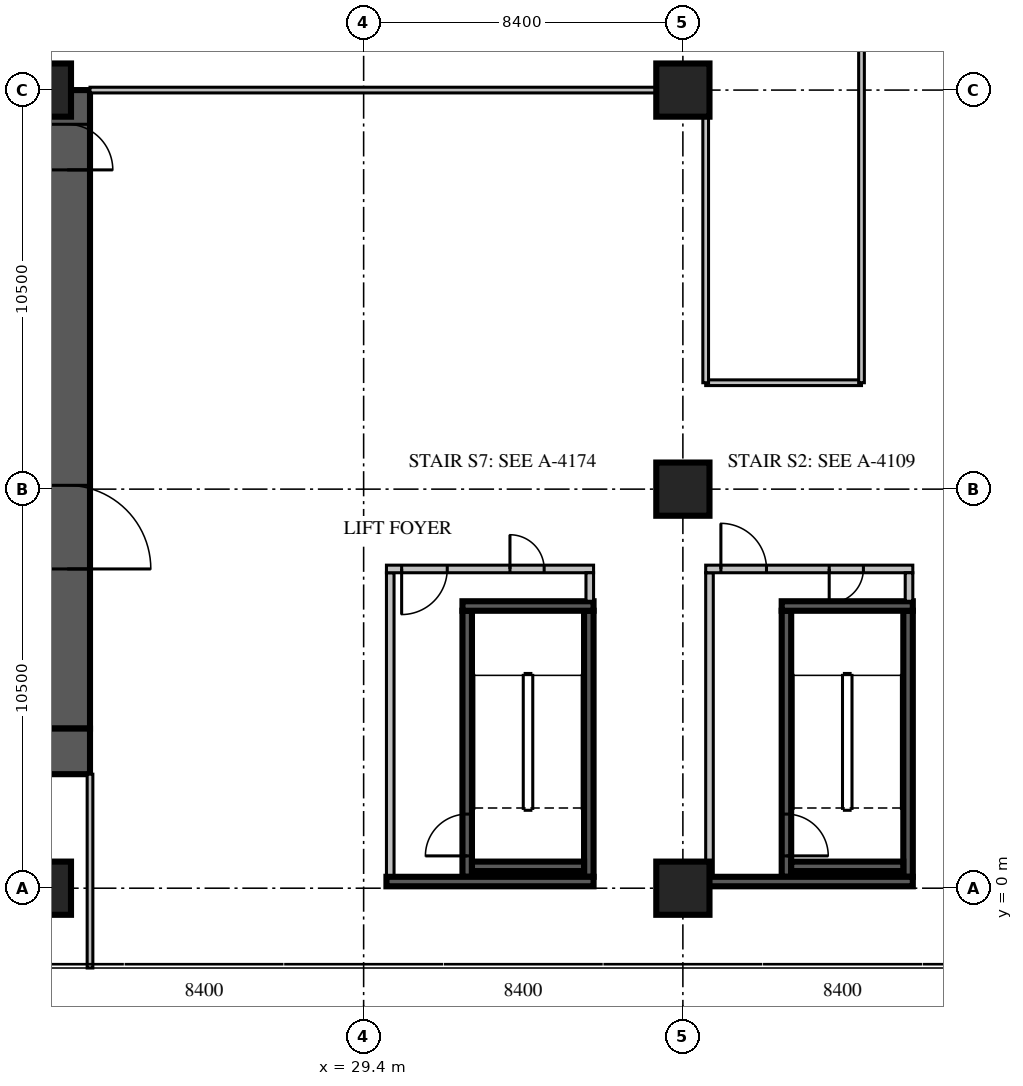
"""IFC4 building model, lengths in metres.
Left out: names, types, materials, properties, quantities, classifications, styles, units other than length and angle.
Written with IfcOpenShell. Run it as: python <this file> out.ifc"""

import sys

from ifc_helpers import new_model, si_unit, direction, frame, frame_2d, origin, origin_2d, place, context, subcontext, project, spatial, rectangle, extrude, source, transform, mapped, element, fill, save


model = new_model("IFC4")
c1 = context("Model", 3, precision=1e-05, world=origin(), true_north=direction((0.0, 1.0)))
c2 = subcontext(c1, "Body", "Model", "MODEL_VIEW")
j1 = project(units=[si_unit("LENGTHUNIT", "METRE"), si_unit("PLANEANGLEUNIT", "RADIAN")], contexts=[c1])
p1 = place(None, origin())
s1 = spatial("IfcSite", under=j1, at=p1, CompositionType="ELEMENT")
p2 = place(p1, origin())
s2 = spatial("IfcBuilding", under=s1, at=p2, CompositionType="ELEMENT")
p3 = place(p2, frame((0.0, 0.0, 7.5)))
s3 = spatial("IfcBuildingStorey", under=s2, at=p3, CompositionType="ELEMENT", Elevation=7.5)
m1 = source(origin(), c2, "Body", "SweptSolid", [
    extrude(rectangle(XDim=1.4, YDim=1.4, at=origin_2d()), origin(), (0.0, 0.0, 1.0), 5.4),
])
for number, where, z_axis, x_axis in (
    (1, (21.0, 0.0, 0.0), (0.0, 0.0, 1.0), (1.0, 0.0, 0.0)),
    (2, (21.0, 21.0, 0.0), (0.0, 0.0, 1.0), (1.0, 0.0, 0.0)),
    (3, (37.8, 0.0, 0.0), (0.0, 0.0, 1.0), (1.0, 0.0, 0.0)),
    (4, (37.8, 10.5, 0.0), (0.0, 0.0, 1.0), (1.0, 0.0, 0.0)),
    (5, (37.8, 21.0, 0.0), (0.0, 0.0, 1.0), (1.0, 0.0, 0.0)),
):
    element("IfcColumn", number, at=place(p3, frame(where, z_axis=z_axis, x_axis=x_axis)), inside=s3, PredefinedType="COLUMN", context=c2, shape_type="MappedRepresentation", body=[
        mapped(m1, transform((0.0, 0.0, 0.0), scale=1.0)),
    ])
p4 = place(p3, frame((21.6, 4.2, 0.0), z_axis=(0.0, 0.0, 1.0), x_axis=(0.0, 1.0, 0.0)))
e6 = element("IfcWall", 6, at=p4, inside=s3, PredefinedType="SHEAR", context=c2, shape_type="SweptSolid", body=[
    extrude(rectangle(XDim=16.8, YDim=1.2, at=frame_2d((8.4, 0.0))), origin(), (0.0, 0.0, 1.0), 5.4),
])
m2 = source(origin(), c2, "Body", "SweptSolid", [
    extrude(rectangle(XDim=2.2, YDim=2.1, at=frame_2d((1.1, 1.05))), frame((0.0, 0.61, 0.0), z_axis=(0.0, -1.0, 0.0), x_axis=(1.0, 0.0, 0.0)), (0.0, 0.0, 1.0), 1.22),
])
p5 = place(p4, frame((4.2, 0.0, 0.0)))
e7 = element("IfcOpeningElement", 7, at=p5, cuts=e6, PredefinedType="OPENING", context=c2, shape_type="MappedRepresentation", body=[
    mapped(m2, transform((0.0, 0.0, 0.0), scale=1.0)),
])
m3 = source(origin(), c2, "Body", "SweptSolid", [
    extrude(rectangle(XDim=1.2, YDim=2.1, at=frame_2d((0.6, 1.05))), frame((0.0, 0.61, 0.0), z_axis=(0.0, -1.0, 0.0), x_axis=(1.0, 0.0, 0.0)), (0.0, 0.0, 1.0), 1.22),
])
p6 = place(p4, frame((14.7, 0.0, 0.0)))
e8 = element("IfcOpeningElement", 8, at=p6, cuts=e6, PredefinedType="OPENING", context=c2, shape_type="MappedRepresentation", body=[
    mapped(m3, transform((0.0, 0.0, 0.0), scale=1.0)),
])
m4 = source(origin(), c2, "Body", "SweptSolid", [
    extrude(rectangle(XDim=18.0, YDim=1.2, at=frame_2d((9.0, 0.0))), origin(), (0.0, 0.0, 1.0), 5.4),
])
p7 = place(p3, frame((4.2, 3.6, 0.0), z_axis=(0.0, 0.0, 1.0), x_axis=(1.0, 0.0, 0.0)))
e9 = element("IfcWall", 9, at=p7, inside=s3, PredefinedType="SHEAR", context=c2, shape_type="MappedRepresentation", body=[
    mapped(m4, transform((0.0, 0.0, 0.0), scale=1.0)),
])
p8 = place(p3, frame((40.525, 0.3, 0.0), z_axis=(0.0, 0.0, 1.0), x_axis=(0.0, 1.0, 0.0)))
e10 = element("IfcWall", 10, at=p8, inside=s3, PredefinedType="SOLIDWALL", context=c2, shape_type="SweptSolid", body=[
    extrude(rectangle(XDim=7.0, YDim=0.25, at=frame_2d((3.5, 0.0))), origin(), (0.0, 0.0, 1.0), 4.8),
])
m5 = source(origin(), c2, "Body", "SweptSolid", [
    extrude(rectangle(XDim=1.1, YDim=2.1, at=frame_2d((0.55, 1.05))), frame((0.0, 0.135, 0.0), z_axis=(0.0, -1.0, 0.0), x_axis=(1.0, 0.0, 0.0)), (0.0, 0.0, 1.0), 0.27),
])
p9 = place(p8, frame((0.55, 0.0, 0.0)))
e11 = element("IfcOpeningElement", 11, at=p9, cuts=e10, PredefinedType="OPENING", context=c2, shape_type="MappedRepresentation", body=[
    mapped(m5, transform((0.0, 0.0, 0.0), scale=1.0)),
])
m6 = source(origin(), c2, "Body", "SweptSolid", [
    extrude(rectangle(XDim=7.0, YDim=0.25, at=frame_2d((3.5, 0.0))), origin(), (0.0, 0.0, 1.0), 4.8),
])
p10 = place(p3, frame((43.725, 0.3, 0.0), z_axis=(0.0, 0.0, 1.0), x_axis=(0.0, 1.0, 0.0)))
e12 = element("IfcWall", 12, at=p10, inside=s3, PredefinedType="SOLIDWALL", context=c2, shape_type="MappedRepresentation", body=[
    mapped(m6, transform((0.0, 0.0, 0.0), scale=1.0)),
])
p11 = place(p3, frame((40.4, 7.425, 0.0), z_axis=(0.0, 0.0, 1.0), x_axis=(1.0, 0.0, 0.0)))
e13 = element("IfcWall", 13, at=p11, inside=s3, PredefinedType="SOLIDWALL", context=c2, shape_type="SweptSolid", body=[
    extrude(rectangle(XDim=3.45, YDim=0.25, at=frame_2d((1.725, 0.0))), origin(), (0.0, 0.0, 1.0), 4.8),
])
p12 = place(p3, frame((40.65, 0.575, 0.0), z_axis=(0.0, 0.0, 1.0), x_axis=(1.0, 0.0, 0.0)))
e14 = element("IfcWall", 14, at=p12, inside=s3, PredefinedType="SOLIDWALL", context=c2, shape_type="SweptSolid", body=[
    extrude(rectangle(XDim=2.95, YDim=0.25, at=frame_2d((1.475, 0.0))), origin(), (0.0, 0.0, 1.0), 4.8),
])
p13 = place(p3, frame((38.5, 0.3, 0.0), z_axis=(0.0, 0.0, 1.0), x_axis=(0.0, 1.0, 0.0)))
e15 = element("IfcWall", 15, at=p13, inside=s3, PredefinedType="PARTITIONING", context=c2, shape_type="SweptSolid", body=[
    extrude(rectangle(XDim=8.0, YDim=0.2, at=frame_2d((4.0, 0.0))), origin(), (0.0, 0.0, 1.0), 4.8),
])
p14 = place(p3, frame((38.4, 8.4, 0.0), z_axis=(0.0, 0.0, 1.0), x_axis=(1.0, 0.0, 0.0)))
e16 = element("IfcWall", 16, at=p14, inside=s3, PredefinedType="PARTITIONING", context=c2, shape_type="SweptSolid", body=[
    extrude(rectangle(XDim=5.45, YDim=0.2, at=frame_2d((2.725, 0.0))), origin(), (0.0, 0.0, 1.0), 4.8),
])
m7 = source(origin(), c2, "Body", "SweptSolid", [
    extrude(rectangle(XDim=1.2, YDim=2.1, at=frame_2d((0.6, 1.05))), frame((0.0, 0.11, 0.0), z_axis=(0.0, -1.0, 0.0), x_axis=(1.0, 0.0, 0.0)), (0.0, 0.0, 1.0), 0.22),
])
p15 = place(p14, frame((0.4, 0.0, 0.0)))
e17 = element("IfcOpeningElement", 17, at=p15, cuts=e16, PredefinedType="OPENING", context=c2, shape_type="MappedRepresentation", body=[
    mapped(m7, transform((0.0, 0.0, 0.0), scale=1.0)),
])
m8 = source(origin(), c2, "Body", "SweptSolid", [
    extrude(rectangle(XDim=0.9, YDim=2.1, at=frame_2d((0.45, 1.05))), frame((0.0, 0.11, 0.0), z_axis=(0.0, -1.0, 0.0), x_axis=(1.0, 0.0, 0.0)), (0.0, 0.0, 1.0), 0.22),
])
p16 = place(p14, frame((3.25, 0.0, 0.0)))
e18 = element("IfcOpeningElement", 18, at=p16, cuts=e16, PredefinedType="OPENING", context=c2, shape_type="MappedRepresentation", body=[
    mapped(m8, transform((0.0, 0.0, 0.0), scale=1.0)),
])
p17 = place(p3, frame((43.75, 7.55, 0.0), z_axis=(0.0, 0.0, 1.0), x_axis=(0.0, 1.0, 0.0)))
e19 = element("IfcWall", 19, at=p17, inside=s3, PredefinedType="PARTITIONING", context=c2, shape_type="SweptSolid", body=[
    extrude(rectangle(XDim=0.75, YDim=0.2, at=frame_2d((0.375, 0.0))), origin(), (0.0, 0.0, 1.0), 4.8),
])
p18 = place(p3, frame((38.4, 0.175, 0.0), z_axis=(0.0, 0.0, 1.0), x_axis=(1.0, 0.0, 0.0)))
e20 = element("IfcWall", 20, at=p18, inside=s3, PredefinedType="SOLIDWALL", context=c2, shape_type="SweptSolid", body=[
    extrude(rectangle(XDim=5.45, YDim=0.25, at=frame_2d((2.725, 0.0))), origin(), (0.0, 0.0, 1.0), 4.8),
])
p19 = place(p3, frame((32.125, 0.3, 0.0), z_axis=(0.0, 0.0, 1.0), x_axis=(0.0, 1.0, 0.0)))
e21 = element("IfcWall", 21, at=p19, inside=s3, PredefinedType="SOLIDWALL", context=c2, shape_type="MappedRepresentation", body=[
    mapped(m6, transform((0.0, 0.0, 0.0), scale=1.0)),
])
p20 = place(p19, frame((0.55, 0.0, 0.0)))
e22 = element("IfcOpeningElement", 22, at=p20, cuts=e21, PredefinedType="OPENING", context=c2, shape_type="MappedRepresentation", body=[
    mapped(m5, transform((0.0, 0.0, 0.0), scale=1.0)),
])
p21 = place(p3, frame((35.325, 0.3, 0.0), z_axis=(0.0, 0.0, 1.0), x_axis=(0.0, 1.0, 0.0)))
e23 = element("IfcWall", 23, at=p21, inside=s3, PredefinedType="SOLIDWALL", context=c2, shape_type="MappedRepresentation", body=[
    mapped(m6, transform((0.0, 0.0, 0.0), scale=1.0)),
])
m9 = source(origin(), c2, "Body", "SweptSolid", [
    extrude(rectangle(XDim=3.45, YDim=0.25, at=frame_2d((1.725, 0.0))), origin(), (0.0, 0.0, 1.0), 4.8),
])
p22 = place(p3, frame((32.0, 7.425, 0.0), z_axis=(0.0, 0.0, 1.0), x_axis=(1.0, 0.0, 0.0)))
e24 = element("IfcWall", 24, at=p22, inside=s3, PredefinedType="SOLIDWALL", context=c2, shape_type="MappedRepresentation", body=[
    mapped(m9, transform((0.0, 0.0, 0.0), scale=1.0)),
])
m10 = source(origin(), c2, "Body", "SweptSolid", [
    extrude(rectangle(XDim=2.95, YDim=0.25, at=frame_2d((1.475, 0.0))), origin(), (0.0, 0.0, 1.0), 4.8),
])
p23 = place(p3, frame((32.25, 0.575, 0.0), z_axis=(0.0, 0.0, 1.0), x_axis=(1.0, 0.0, 0.0)))
e25 = element("IfcWall", 25, at=p23, inside=s3, PredefinedType="SOLIDWALL", context=c2, shape_type="MappedRepresentation", body=[
    mapped(m10, transform((0.0, 0.0, 0.0), scale=1.0)),
])
m11 = source(origin(), c2, "Body", "SweptSolid", [
    extrude(rectangle(XDim=8.0, YDim=0.2, at=frame_2d((4.0, 0.0))), origin(), (0.0, 0.0, 1.0), 4.8),
])
p24 = place(p3, frame((30.1, 0.3, 0.0), z_axis=(0.0, 0.0, 1.0), x_axis=(0.0, 1.0, 0.0)))
e26 = element("IfcWall", 26, at=p24, inside=s3, PredefinedType="PARTITIONING", context=c2, shape_type="MappedRepresentation", body=[
    mapped(m11, transform((0.0, 0.0, 0.0), scale=1.0)),
])
m12 = source(origin(), c2, "Body", "SweptSolid", [
    extrude(rectangle(XDim=5.45, YDim=0.2, at=frame_2d((2.725, 0.0))), origin(), (0.0, 0.0, 1.0), 4.8),
])
p25 = place(p3, frame((30.0, 8.4, 0.0), z_axis=(0.0, 0.0, 1.0), x_axis=(1.0, 0.0, 0.0)))
e27 = element("IfcWall", 27, at=p25, inside=s3, PredefinedType="PARTITIONING", context=c2, shape_type="MappedRepresentation", body=[
    mapped(m12, transform((0.0, 0.0, 0.0), scale=1.0)),
])
p26 = place(p25, frame((0.4, 0.0, 0.0)))
e28 = element("IfcOpeningElement", 28, at=p26, cuts=e27, PredefinedType="OPENING", context=c2, shape_type="MappedRepresentation", body=[
    mapped(m7, transform((0.0, 0.0, 0.0), scale=1.0)),
])
p27 = place(p25, frame((3.25, 0.0, 0.0)))
e29 = element("IfcOpeningElement", 29, at=p27, cuts=e27, PredefinedType="OPENING", context=c2, shape_type="MappedRepresentation", body=[
    mapped(m8, transform((0.0, 0.0, 0.0), scale=1.0)),
])
m13 = source(origin(), c2, "Body", "SweptSolid", [
    extrude(rectangle(XDim=0.75, YDim=0.2, at=frame_2d((0.375, 0.0))), origin(), (0.0, 0.0, 1.0), 4.8),
])
p28 = place(p3, frame((35.35, 7.55, 0.0), z_axis=(0.0, 0.0, 1.0), x_axis=(0.0, 1.0, 0.0)))
e30 = element("IfcWall", 30, at=p28, inside=s3, PredefinedType="PARTITIONING", context=c2, shape_type="MappedRepresentation", body=[
    mapped(m13, transform((0.0, 0.0, 0.0), scale=1.0)),
])
m14 = source(origin(), c2, "Body", "SweptSolid", [
    extrude(rectangle(XDim=5.45, YDim=0.25, at=frame_2d((2.725, 0.0))), origin(), (0.0, 0.0, 1.0), 4.8),
])
p29 = place(p3, frame((30.0, 0.175, 0.0), z_axis=(0.0, 0.0, 1.0), x_axis=(1.0, 0.0, 0.0)))
e31 = element("IfcWall", 31, at=p29, inside=s3, PredefinedType="SOLIDWALL", context=c2, shape_type="MappedRepresentation", body=[
    mapped(m14, transform((0.0, 0.0, 0.0), scale=1.0)),
])
p30 = place(p3, frame((38.4, 13.3, 0.0), z_axis=(0.0, 0.0, 1.0), x_axis=(1.0, 0.0, 0.0)))
e32 = element("IfcWall", 32, at=p30, inside=s3, PredefinedType="PARTITIONING", context=c2, shape_type="SweptSolid", body=[
    extrude(rectangle(XDim=4.1, YDim=0.15, at=frame_2d((2.05, 0.0))), origin(), (0.0, 0.0, 1.0), 4.8),
])
p31 = place(p3, frame((22.2, 21.0, 0.0), z_axis=(0.0, 0.0, 1.0), x_axis=(1.0, 0.0, 0.0)))
e33 = element("IfcWall", 33, at=p31, inside=s3, PredefinedType="PARTITIONING", context=c2, shape_type="SweptSolid", body=[
    extrude(rectangle(XDim=16.2, YDim=0.15, at=frame_2d((8.1, 0.0))), origin(), (0.0, 0.0, 1.0), 4.8),
])
m15 = source(origin(), c2, "Body", "SweptSolid", [
    extrude(rectangle(XDim=5.1, YDim=0.15, at=frame_2d((2.55, 0.0))), origin(), (0.0, 0.0, 1.0), 4.8),
])
p32 = place(p3, frame((22.2, -2.1, 0.0), z_axis=(0.0, 0.0, 1.0), x_axis=(0.0, 1.0, 0.0)))
e34 = element("IfcWall", 34, at=p32, inside=s3, PredefinedType="PARTITIONING", context=c2, shape_type="MappedRepresentation", body=[
    mapped(m15, transform((0.0, 0.0, 0.0), scale=1.0)),
])
p33 = place(p3, frame((38.4, 13.3, 0.0), z_axis=(0.0, 0.0, 1.0), x_axis=(0.0, 1.0, 0.0)))
e35 = element("IfcWall", 35, at=p33, inside=s3, PredefinedType="PARTITIONING", context=c2, shape_type="SweptSolid", body=[
    extrude(rectangle(XDim=7.7, YDim=0.15, at=frame_2d((3.85, 0.0))), origin(), (0.0, 0.0, 1.0), 4.8),
])
m16 = source(origin(), c2, "Body", "SweptSolid", [
    extrude(rectangle(XDim=29.2, YDim=0.15, at=frame_2d((14.6, 0.0))), origin(), (0.0, 0.0, 1.0), 4.8),
])
p34 = place(p3, frame((42.5, 13.3, 0.0), z_axis=(0.0, 0.0, 1.0), x_axis=(0.0, 1.0, 0.0)))
e36 = element("IfcWall", 36, at=p34, inside=s3, PredefinedType="PARTITIONING", context=c2, shape_type="MappedRepresentation", body=[
    mapped(m16, transform((0.0, 0.0, 0.0), scale=1.0)),
])
m17 = source(origin(), c2, "Body", "SweptSolid", [
    extrude(rectangle(XDim=1.8, YDim=2.1, at=frame_2d((0.9, 1.05))), frame((0.0, 0.085, 0.0), z_axis=(0.0, -1.0, 0.0), x_axis=(1.0, 0.0, 0.0)), (0.0, 0.0, 1.0), 0.17),
])
p35 = place(p34, frame((13.7, 0.0, 0.0)))
e37 = element("IfcOpeningElement", 37, at=p35, cuts=e36, PredefinedType="OPENING", context=c2, shape_type="MappedRepresentation", body=[
    mapped(m17, transform((0.0, 0.0, 0.0), scale=1.0)),
])
m18 = source(origin(), c2, "Body", "SweptSolid", [
    extrude(rectangle(XDim=1.1, YDim=2.1, at=frame_2d((0.55, 1.05))), frame((0.0, 0.025, 0.0), z_axis=(0.0, -1.0, 0.0), x_axis=(1.0, 0.0, 0.0)), (0.0, 0.0, 1.0), 0.05),
])
p36 = place(p9, origin())
e38 = element("IfcDoor", 38, at=p36, inside=s3, OperationType="SINGLE_SWING_RIGHT", PredefinedType="DOOR", context=c2, shape_type="MappedRepresentation", body=[
    mapped(m18, transform((0.0, 0.0, 0.0), scale=1.0)),
])
fill(e11, e38)
m19 = source(origin(), c2, "Body", "SweptSolid", [
    extrude(rectangle(XDim=1.2, YDim=2.1, at=frame_2d((0.6, 1.05))), frame((0.0, 0.025, 0.0), z_axis=(0.0, -1.0, 0.0), x_axis=(1.0, 0.0, 0.0)), (0.0, 0.0, 1.0), 0.05),
])
p37 = place(p15, origin())
e39 = element("IfcDoor", 39, at=p37, inside=s3, OperationType="SINGLE_SWING_LEFT", PredefinedType="DOOR", context=c2, shape_type="MappedRepresentation", body=[
    mapped(m19, transform((0.0, 0.0, 0.0), scale=1.0)),
])
fill(e17, e39)
m20 = source(origin(), c2, "Body", "SweptSolid", [
    extrude(rectangle(XDim=0.9, YDim=2.1, at=frame_2d((0.45, 1.05))), frame((0.0, 0.025, 0.0), z_axis=(0.0, -1.0, 0.0), x_axis=(1.0, 0.0, 0.0)), (0.0, 0.0, 1.0), 0.05),
])
p38 = place(p16, origin())
e40 = element("IfcDoor", 40, at=p38, inside=s3, OperationType="SINGLE_SWING_RIGHT", PredefinedType="DOOR", context=c2, shape_type="MappedRepresentation", body=[
    mapped(m20, transform((0.0, 0.0, 0.0), scale=1.0)),
])
fill(e18, e40)
p39 = place(p20, origin())
e41 = element("IfcDoor", 41, at=p39, inside=s3, OperationType="SINGLE_SWING_LEFT", PredefinedType="DOOR", context=c2, shape_type="MappedRepresentation", body=[
    mapped(m18, transform((0.0, 0.0, 0.0), scale=1.0)),
])
fill(e22, e41)
p40 = place(p26, origin())
e42 = element("IfcDoor", 42, at=p40, inside=s3, OperationType="SINGLE_SWING_RIGHT", PredefinedType="DOOR", context=c2, shape_type="MappedRepresentation", body=[
    mapped(m19, transform((0.0, 0.0, 0.0), scale=1.0)),
])
fill(e28, e42)
p41 = place(p27, origin())
e43 = element("IfcDoor", 43, at=p41, inside=s3, OperationType="SINGLE_SWING_LEFT", PredefinedType="DOOR", context=c2, shape_type="MappedRepresentation", body=[
    mapped(m20, transform((0.0, 0.0, 0.0), scale=1.0)),
])
fill(e29, e43)
m21 = source(origin(), c2, "Body", "SweptSolid", [
    extrude(rectangle(XDim=2.2, YDim=2.1, at=frame_2d((1.1, 1.05))), frame((0.0, 0.025, 0.0), z_axis=(0.0, -1.0, 0.0), x_axis=(1.0, 0.0, 0.0)), (0.0, 0.0, 1.0), 0.05),
])
p42 = place(p5, origin())
e44 = element("IfcDoor", 44, at=p42, inside=s3, OperationType="DOUBLE_DOOR_SINGLE_SWING", PredefinedType="DOOR", context=c2, shape_type="MappedRepresentation", body=[
    mapped(m21, transform((0.0, 0.0, 0.0), scale=1.0)),
])
fill(e7, e44)
p43 = place(p6, origin())
e45 = element("IfcDoor", 45, at=p43, inside=s3, OperationType="SINGLE_SWING_RIGHT", PredefinedType="DOOR", context=c2, shape_type="MappedRepresentation", body=[
    mapped(m19, transform((0.0, 0.0, 0.0), scale=1.0)),
])
fill(e8, e45)
save(model, sys.argv[1])
